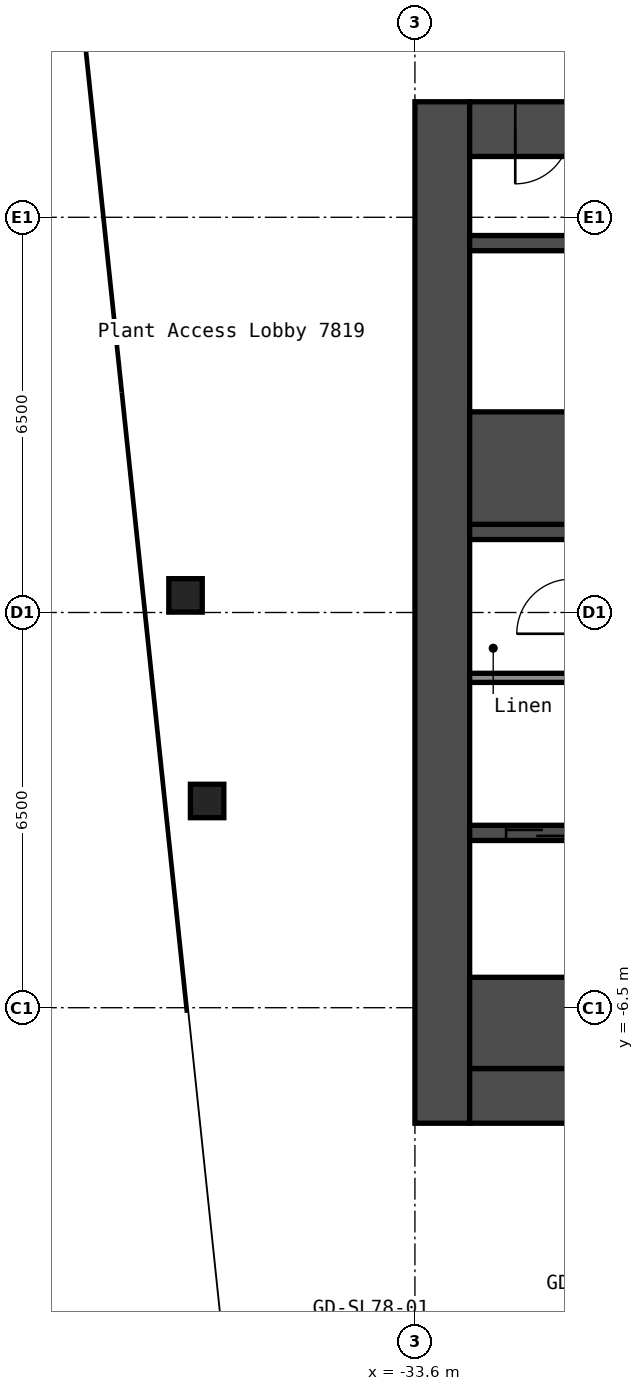
"""IFC4 building model, lengths in metres.
Left out: names, types, materials, properties, quantities, classifications, styles, units other than length and angle.
Written with IfcOpenShell. Run it as: python <this file> out.ifc"""

import sys

from ifc_helpers import new_model, si_unit, direction, frame, frame_2d, origin, origin_2d, place, context, subcontext, project, spatial, rectangle, hollow_rectangle, extrude, element, fill, save


model = new_model("IFC4")
c1 = context("Model", 3, precision=1e-05, world=origin(), true_north=direction((0.0, 1.0)))
c2 = subcontext(c1, "Body", "Model", "MODEL_VIEW")
j1 = project(units=[si_unit("LENGTHUNIT", "METRE"), si_unit("PLANEANGLEUNIT", "RADIAN")], contexts=[c1])
p1 = place(None, origin())
s1 = spatial("IfcSite", under=j1, at=p1, CompositionType="ELEMENT")
p2 = place(p1, origin())
s2 = spatial("IfcBuilding", under=s1, at=p2, CompositionType="ELEMENT")
p3 = place(p2, frame((0.0, 0.0, 280.8)))
s3 = spatial("IfcBuildingStorey", under=s2, at=p3, CompositionType="ELEMENT", Elevation=280.8)
for number, where, z_axis, x_axis in (
    (1, (-37.017, -3.1, 0.0), (0.0, 0.0, 1.0), (1.0, 0.0, 0.0)),
    (2, (-37.373, 0.281, 0.0), (0.0, 0.0, 1.0), (1.0, 0.0, 0.0)),
):
    element("IfcColumn", number, at=place(p3, frame(where, z_axis=z_axis, x_axis=x_axis)), inside=s3, PredefinedType="COLUMN", context=c2, shape_type="SweptSolid", body=[
        extrude(hollow_rectangle(XDim=0.55, YDim=0.55, WallThickness=0.022, InnerFilletRadius=0.033, OuterFilletRadius=0.055, at=origin_2d()), origin(), (0.0, 0.0, 1.0), 4.0),
    ])
p4 = place(p3, frame((-33.15, -8.4, 0.0), z_axis=(0.0, 0.0, 1.0), x_axis=(0.0, 1.0, 0.0)))
e3 = element("IfcWall", 3, at=p4, inside=s3, PredefinedType="SHEAR", context=c2, shape_type="SweptSolid", body=[
    extrude(rectangle(XDim=16.8, YDim=0.9, at=frame_2d((8.4, 0.0))), origin(), (0.0, 0.0, 1.0), 4.0),
])
p5 = place(p3, frame((-32.7, 7.95, 0.0), z_axis=(0.0, 0.0, 1.0), x_axis=(1.0, 0.0, 0.0)))
e4 = element("IfcWall", 4, at=p5, inside=s3, PredefinedType="SHEAR", context=c2, shape_type="SweptSolid", body=[
    extrude(rectangle(XDim=15.0, YDim=0.9, at=frame_2d((7.5, 0.0))), origin(), (0.0, 0.0, 1.0), 4.0),
])
p6 = place(p5, frame((3.4, 0.0, 0.0)))
e5 = element("IfcOpeningElement", 5, at=p6, cuts=e4, PredefinedType="OPENING", context=c2, shape_type="SweptSolid", body=[
    extrude(rectangle(XDim=1.2, YDim=2.1, at=frame_2d((0.6, 1.05))), frame((0.0, 0.46, 0.0), z_axis=(0.0, -1.0, 0.0), x_axis=(1.0, 0.0, 0.0)), (0.0, 0.0, 1.0), 0.92),
])
p7 = place(p5, frame((0.75, 0.0, 0.0)))
e6 = element("IfcOpeningElement", 6, at=p7, cuts=e4, PredefinedType="OPENING", context=c2, shape_type="SweptSolid", body=[
    extrude(rectangle(XDim=0.9, YDim=2.1, at=frame_2d((0.45, 1.05))), frame((0.0, 0.46, 0.0), z_axis=(0.0, -1.0, 0.0), x_axis=(1.0, 0.0, 0.0)), (0.0, 0.0, 1.0), 0.92),
])
p8 = place(p3, frame((-32.7, -7.95, 0.0), z_axis=(0.0, 0.0, 1.0), x_axis=(1.0, 0.0, 0.0)))
e7 = element("IfcWall", 7, at=p8, inside=s3, PredefinedType="SHEAR", context=c2, shape_type="SweptSolid", body=[
    extrude(rectangle(XDim=15.0, YDim=0.9, at=frame_2d((7.5, 0.0))), origin(), (0.0, 0.0, 1.0), 4.0),
])
p9 = place(p8, frame((11.45, 0.0, 0.0)))
e8 = element("IfcOpeningElement", 8, at=p9, cuts=e7, PredefinedType="OPENING", context=c2, shape_type="SweptSolid", body=[
    extrude(rectangle(XDim=1.0, YDim=2.1, at=frame_2d((0.5, 1.05))), frame((0.0, 0.46, 0.0), z_axis=(0.0, -1.0, 0.0), x_axis=(1.0, 0.0, 0.0)), (0.0, 0.0, 1.0), 0.92),
])
p10 = place(p3, frame((-32.7, 1.325, 0.0), z_axis=(0.0, 0.0, 1.0), x_axis=(1.0, 0.0, 0.0)))
e9 = element("IfcWall", 9, at=p10, inside=s3, PredefinedType="SHEAR", context=c2, shape_type="SweptSolid", body=[
    extrude(rectangle(XDim=5.05, YDim=0.25, at=frame_2d((2.525, 0.0))), origin(), (0.0, 0.0, 1.0), 4.0),
])
p11 = place(p10, frame((3.3, 0.0, 0.0)))
e10 = element("IfcOpeningElement", 10, at=p11, cuts=e9, PredefinedType="OPENING", context=c2, shape_type="SweptSolid", body=[
    extrude(rectangle(XDim=1.2, YDim=2.1, at=frame_2d((0.6, 1.05))), frame((0.0, 0.135, 0.0), z_axis=(0.0, -1.0, 0.0), x_axis=(1.0, 0.0, 0.0)), (0.0, 0.0, 1.0), 0.27),
])
p12 = place(p3, frame((-32.7, 2.375, 0.0), z_axis=(0.0, 0.0, 1.0), x_axis=(1.0, 0.0, 0.0)))
e11 = element("IfcWall", 11, at=p12, inside=s3, PredefinedType="SHEAR", context=c2, shape_type="SweptSolid", body=[
    extrude(rectangle(XDim=2.4, YDim=1.85, at=frame_2d((1.2, 0.0))), origin(), (0.0, 0.0, 1.0), 4.0),
])
p13 = place(p3, frame((-32.7, 6.075, 0.0), z_axis=(0.0, 0.0, 1.0), x_axis=(1.0, 0.0, 0.0)))
e12 = element("IfcWall", 12, at=p13, inside=s3, PredefinedType="SHEAR", context=c2, shape_type="SweptSolid", body=[
    extrude(rectangle(XDim=2.4, YDim=0.25, at=frame_2d((1.2, 0.0))), origin(), (0.0, 0.0, 1.0), 4.0),
])
p14 = place(p3, frame((-32.7, -3.625, 0.0), z_axis=(0.0, 0.0, 1.0), x_axis=(1.0, 0.0, 0.0)))
e13 = element("IfcWall", 13, at=p14, inside=s3, PredefinedType="SHEAR", context=c2, shape_type="SweptSolid", body=[
    extrude(rectangle(XDim=4.55, YDim=0.25, at=frame_2d((2.275, 0.0))), origin(), (0.0, 0.0, 1.0), 4.0),
])
p15 = place(p14, frame((2.85, 0.0, 0.0)))
e14 = element("IfcOpeningElement", 14, at=p15, cuts=e13, PredefinedType="OPENING", context=c2, shape_type="SweptSolid", body=[
    extrude(rectangle(XDim=1.1, YDim=2.1, at=frame_2d((0.55, 1.05))), frame((0.0, 0.135, 0.0), z_axis=(0.0, -1.0, 0.0), x_axis=(1.0, 0.0, 0.0)), (0.0, 0.0, 1.0), 0.27),
])
p16 = place(p14, frame((0.6, 0.0, 0.0)))
e15 = element("IfcOpeningElement", 15, at=p16, cuts=e13, PredefinedType="OPENING", context=c2, shape_type="SweptSolid", body=[
    extrude(rectangle(XDim=1.1, YDim=2.1, at=frame_2d((0.55, 1.05))), frame((0.0, 0.135, 0.0), z_axis=(0.0, -1.0, 0.0), x_axis=(1.0, 0.0, 0.0)), (0.0, 0.0, 1.0), 0.27),
])
p17 = place(p3, frame((-32.7, -6.75, 0.0), z_axis=(0.0, 0.0, 1.0), x_axis=(1.0, 0.0, 0.0)))
e16 = element("IfcWall", 16, at=p17, inside=s3, PredefinedType="SHEAR", context=c2, shape_type="SweptSolid", body=[
    extrude(rectangle(XDim=4.55, YDim=1.5, at=frame_2d((2.275, 0.0))), origin(), (0.0, 0.0, 1.0), 4.0),
])
p18 = place(p3, frame((-32.7, -1.075, 0.0), z_axis=(0.0, 0.0, 1.0), x_axis=(1.0, 0.0, 0.0)))
e17 = element("IfcWall", 17, at=p18, inside=s3, PredefinedType="PARTITIONING", context=c2, shape_type="SweptSolid", body=[
    extrude(rectangle(XDim=1.6, YDim=0.15, at=frame_2d((0.8, 0.0))), origin(), (0.0, 0.0, 1.0), 4.0),
])
p19 = place(p3, frame((-36.712, -12.705, 0.0), z_axis=(0.0, 0.0, 1.0), x_axis=(0.994522460242, 0.104523088709, 0.0)))
e18 = element("IfcWall", 18, at=p19, inside=s3, PredefinedType="PARTITIONING", context=c2, shape_type="SweptSolid", body=[
    extrude(rectangle(XDim=21.3, YDim=0.2, at=frame_2d((10.65, 0.0))), origin(), (0.0, 0.0, 1.0), 4.0),
])
p20 = place(p19, frame((1.95, 0.0, 0.0)))
e19 = element("IfcOpeningElement", 19, at=p20, cuts=e18, PredefinedType="OPENING", context=c2, shape_type="SweptSolid", body=[
    extrude(rectangle(XDim=0.9, YDim=2.1, at=frame_2d((0.45, 1.05))), frame((0.0, 0.11, 0.0), z_axis=(0.0, -1.0, 0.0), x_axis=(1.0, 0.0, 0.0)), (0.0, 0.0, 1.0), 0.22),
])
p21 = place(p19, frame((5.815, 0.0, 0.0)))
e20 = element("IfcOpeningElement", 20, at=p21, cuts=e18, PredefinedType="OPENING", context=c2, shape_type="SweptSolid", body=[
    extrude(rectangle(XDim=0.9, YDim=2.1, at=frame_2d((0.45, 1.05))), frame((0.0, 0.11, 0.0), z_axis=(0.0, -1.0, 0.0), x_axis=(1.0, 0.0, 0.0)), (0.0, 0.0, 1.0), 0.22),
])
p22 = place(p19, frame((10.015, 0.0, 0.0)))
e21 = element("IfcOpeningElement", 21, at=p22, cuts=e18, PredefinedType="OPENING", context=c2, shape_type="SweptSolid", body=[
    extrude(rectangle(XDim=0.9, YDim=2.1, at=frame_2d((0.45, 1.05))), frame((0.0, 0.11, 0.0), z_axis=(0.0, -1.0, 0.0), x_axis=(1.0, 0.0, 0.0)), (0.0, 0.0, 1.0), 0.22),
])
p23 = place(p19, frame((14.72, 0.0, 0.0)))
e22 = element("IfcOpeningElement", 22, at=p23, cuts=e18, PredefinedType="OPENING", context=c2, shape_type="SweptSolid", body=[
    extrude(rectangle(XDim=0.9, YDim=2.1, at=frame_2d((0.45, 1.05))), frame((0.0, 0.11, 0.0), z_axis=(0.0, -1.0, 0.0), x_axis=(1.0, 0.0, 0.0)), (0.0, 0.0, 1.0), 0.22),
])
p24 = place(p19, frame((18.92, 0.0, 0.0)))
e23 = element("IfcOpeningElement", 23, at=p24, cuts=e18, PredefinedType="OPENING", context=c2, shape_type="SweptSolid", body=[
    extrude(rectangle(XDim=0.9, YDim=2.1, at=frame_2d((0.45, 1.05))), frame((0.0, 0.11, 0.0), z_axis=(0.0, -1.0, 0.0), x_axis=(1.0, 0.0, 0.0)), (0.0, 0.0, 1.0), 0.22),
])
p25 = place(p7, origin())
e24 = element("IfcDoor", 24, at=p25, inside=s3, OperationType="SINGLE_SWING_LEFT", PredefinedType="DOOR", context=c2, shape_type="SweptSolid", body=[
    extrude(rectangle(XDim=0.9, YDim=2.1, at=frame_2d((0.45, 1.05))), frame((0.0, 0.025, 0.0), z_axis=(0.0, -1.0, 0.0), x_axis=(1.0, 0.0, 0.0)), (0.0, 0.0, 1.0), 0.05),
])
fill(e6, e24)
p26 = place(p16, origin())
e25 = element("IfcDoor", 25, at=p26, inside=s3, OperationType="DOUBLE_DOOR_SLIDING", PredefinedType="DOOR", context=c2, shape_type="SweptSolid", body=[
    extrude(rectangle(XDim=1.1, YDim=2.1, at=frame_2d((0.55, 1.05))), frame((0.0, 0.025, 0.0), z_axis=(0.0, -1.0, 0.0), x_axis=(1.0, 0.0, 0.0)), (0.0, 0.0, 1.0), 0.05),
])
fill(e15, e25)
save(model, sys.argv[1])
